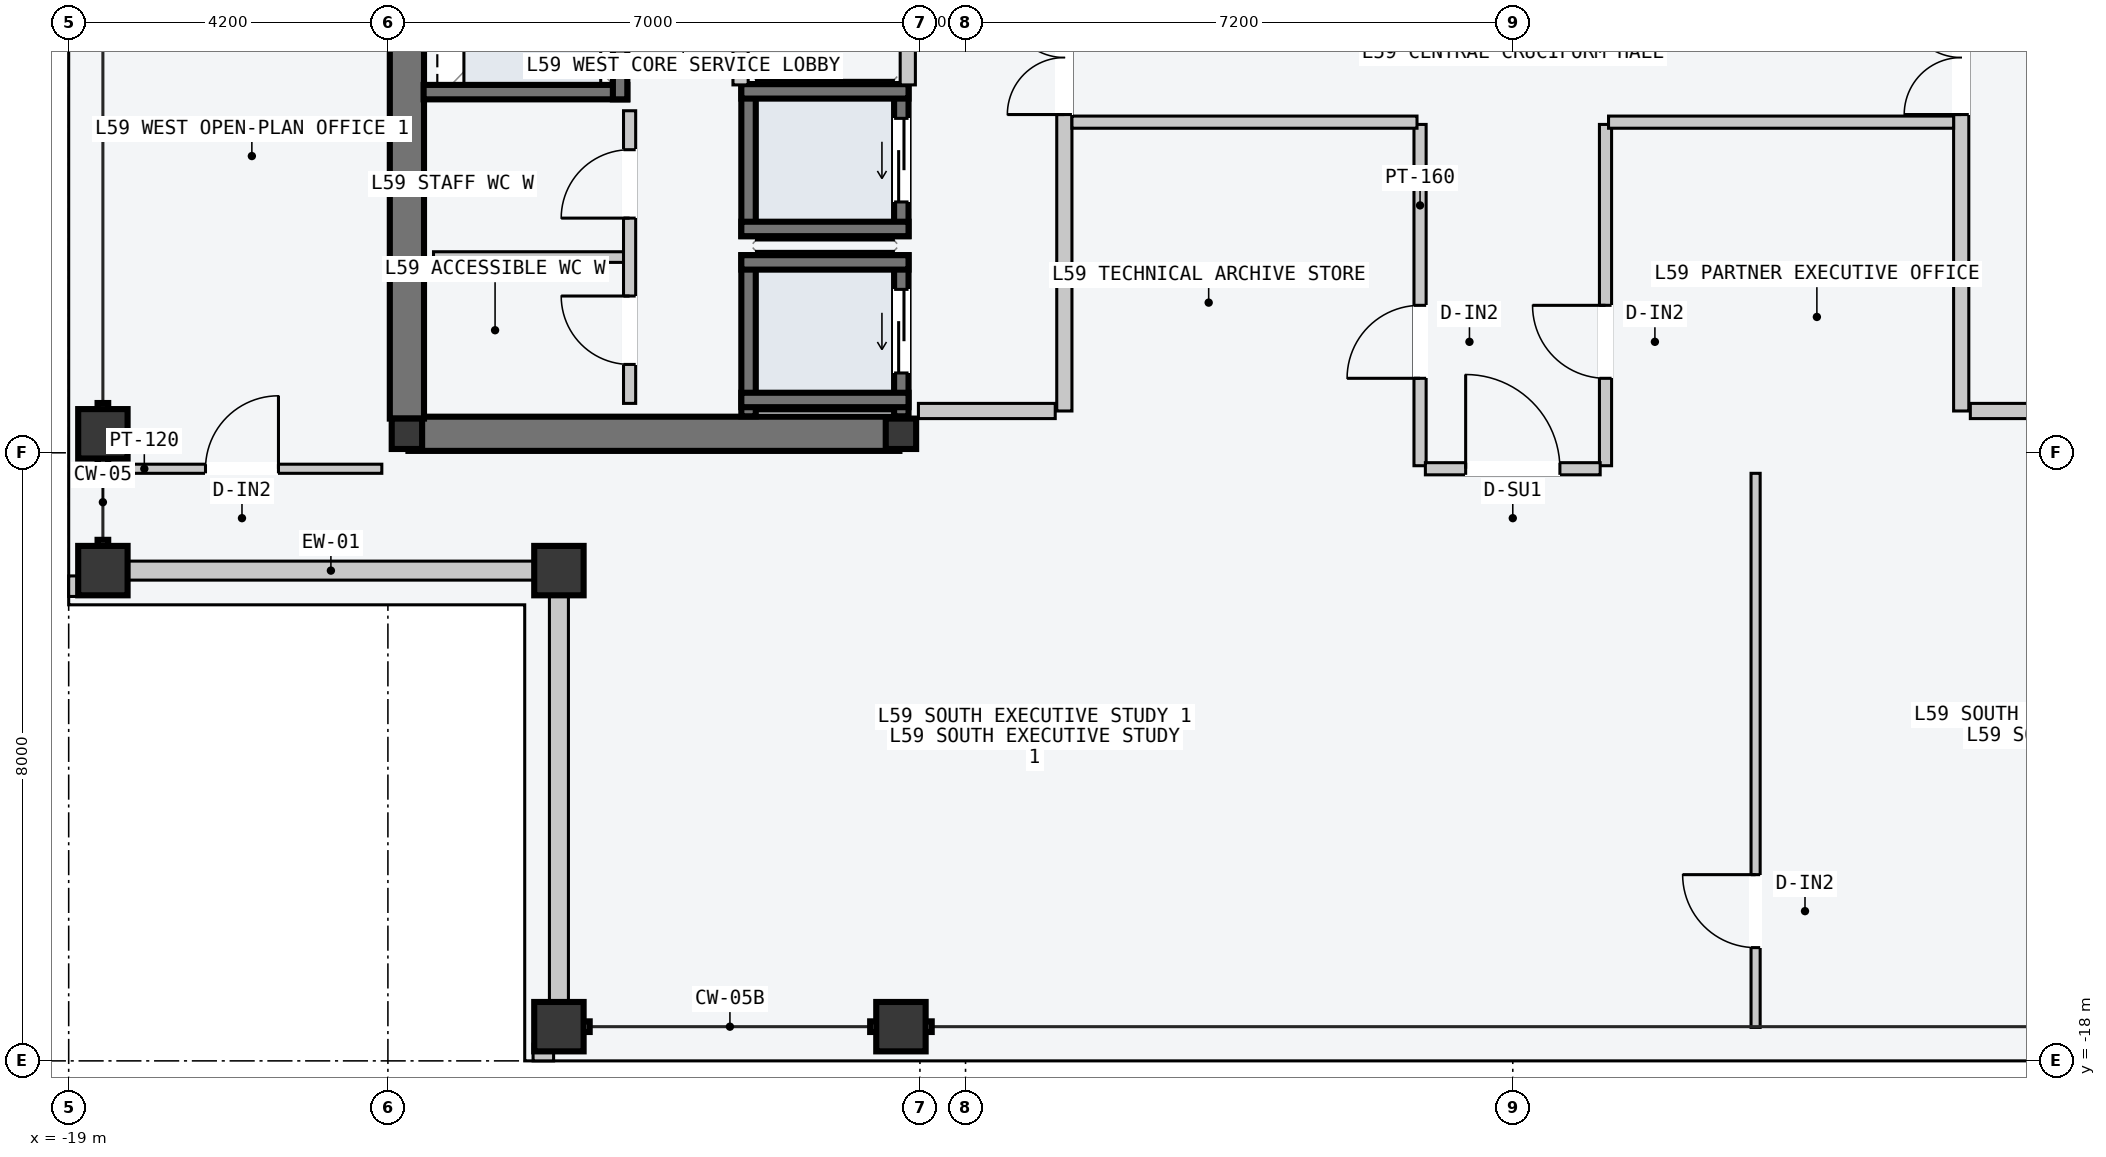
"""IFC4 building model, lengths in metres.
Left out: names, types, materials, properties, quantities, classifications, styles, units other than length and angle.
Written with IfcOpenShell. Run it as: python <this file> out.ifc"""

import sys

from ifc_helpers import new_model, si_unit, direction, frame, frame_2d, origin, origin_2d, place, context, subcontext, project, spatial, rectangle, hollow_rectangle, i_section, extrude, element, fill, save


model = new_model("IFC4")
c1 = context("Model", 3, precision=1e-05, world=origin(), true_north=direction((0.0, 1.0)))
c2 = subcontext(c1, "Body", "Model", "MODEL_VIEW")
j1 = project(units=[si_unit("LENGTHUNIT", "METRE"), si_unit("PLANEANGLEUNIT", "RADIAN")], contexts=[c1])
p1 = place(None, origin())
s1 = spatial("IfcSite", under=j1, at=p1, CompositionType="ELEMENT")
p2 = place(p1, origin())
s2 = spatial("IfcBuilding", under=s1, at=p2, CompositionType="ELEMENT")
p3 = place(p2, frame((0.0, 0.0, 225.6)))
s3 = spatial("IfcBuildingStorey", under=s2, at=p3, CompositionType="ELEMENT", Elevation=225.6)
p4 = place(p3, frame((-14.53, -9.75, -0.2), z_axis=(0.0, 0.0, 1.0), x_axis=(1.0, 0.0, 0.0)))
e1 = element("IfcWall", 1, at=p4, inside=s3, PredefinedType="SHEAR", context=c2, shape_type="SweptSolid", body=[
    extrude(rectangle(XDim=6.46, YDim=0.45, at=frame_2d((3.23, 0.0))), origin(), (0.0, 0.0, 1.0), 3.6),
])
p5 = place(p3, frame((-14.55, -9.55, -0.2), z_axis=(0.0, 0.0, 1.0), x_axis=(0.0, 1.0, 0.0)))
e2 = element("IfcWall", 2, at=p5, inside=s3, PredefinedType="SHEAR", context=c2, shape_type="SweptSolid", body=[
    extrude(rectangle(XDim=9.35, YDim=0.45, at=frame_2d((4.675, 0.0))), origin(), (0.0, 0.0, 1.0), 3.6),
])
for number, where, z_axis, x_axis in (
    (3, (-14.55, -9.75, 0.0), (0.0, 0.0, 1.0), (1.0, 0.0, 0.0)),
    (4, (-8.05, -9.75, 0.0), (0.0, 0.0, 1.0), (1.0, 0.0, 0.0)),
):
    element("IfcColumn", number, at=place(p3, frame(where, z_axis=z_axis, x_axis=x_axis)), inside=s3, PredefinedType="COLUMN", context=c2, shape_type="SweptSolid", body=[
        extrude(i_section(OverallWidth=0.4, OverallDepth=0.4, WebThickness=0.013, FlangeThickness=0.021, at=origin_2d()), origin(), (0.0, 0.0, 1.0), 3.6),
    ])
for number, where, z_axis, x_axis in (
    (5, (-12.55, -17.55, 0.0), (0.0, 0.0, 1.0), (1.0, 0.0, 0.0)),
    (6, (-8.05, -17.55, 0.0), (0.0, 0.0, 1.0), (1.0, 0.0, 0.0)),
    (7, (-18.55, -11.55, 0.0), (0.0, 0.0, 1.0), (0.0, 1.0, 0.0)),
    (8, (-18.55, -9.75, 0.0), (0.0, 0.0, 1.0), (0.0, 1.0, 0.0)),
    (9, (-12.55, -11.55, 0.0), (0.0, 0.0, 1.0), (1.0, 0.0, 0.0)),
):
    element("IfcColumn", number, at=place(p3, frame(where, z_axis=z_axis, x_axis=x_axis)), inside=s3, PredefinedType="COLUMN", context=c2, shape_type="SweptSolid", body=[
        extrude(hollow_rectangle(XDim=0.65, YDim=0.65, WallThickness=0.028, at=origin_2d()), origin(), (0.0, 0.0, 1.0), 3.6),
    ])
for number, where, z_axis, x_axis in (
    (10, (-18.215, -11.55, 0.0), (0.0, 0.0, 1.0), (1.0, 0.0, 0.0)),
    (11, (-12.55, -17.215, 0.0), (0.0, 0.0, 1.0), (0.0, 1.0, 0.0)),
):
    element("IfcWall", number, at=place(p3, frame(where, z_axis=z_axis, x_axis=x_axis)), inside=s3, PredefinedType="STANDARD", context=c2, shape_type="SweptSolid", body=[
        extrude(rectangle(XDim=5.33, YDim=0.25, at=frame_2d((2.665, 0.0))), origin(), (0.0, 0.0, 1.0), 2.85),
    ])
for number, where, z_axis, x_axis in (
    (12, (-12.89, -17.89, 0.0), (0.0, 0.0, 1.0), (1.0, 0.0, 0.0)),
    (13, (-18.89, -11.89, 0.0), (0.0, 0.0, 1.0), (0.0, 1.0, 0.0)),
):
    element("IfcWall", number, at=place(p3, frame(where, z_axis=z_axis, x_axis=x_axis)), inside=s3, PredefinedType="PARAPET", context=c2, shape_type="SweptSolid", body=[
        extrude(rectangle(XDim=0.27, YDim=0.22, at=frame_2d((0.135, 0.0))), origin(), (0.0, 0.0, 1.0), 1.2),
    ])
p6 = place(p3, frame((-8.045, -9.52, -0.2), z_axis=(0.0, 0.0, 1.0), x_axis=(0.0, 1.0, 0.0)))
e14 = element("IfcWall", 14, at=p6, inside=s3, PredefinedType="SOLIDWALL", context=c2, shape_type="SweptSolid", body=[
    extrude(rectangle(XDim=2.12, YDim=0.19, at=frame_2d((1.06, 0.0))), origin(), (0.0, 0.0, 1.0), 3.6),
])
p7 = place(p6, frame((0.57, 0.0, 0.2)))
e15 = element("IfcOpeningElement", 15, at=p7, cuts=e14, PredefinedType="OPENING", context=c2, shape_type="SweptSolid", body=[
    extrude(rectangle(XDim=1.1, YDim=2.2, at=frame_2d((0.55, 1.1))), frame((0.0, 0.105, 0.0), z_axis=(0.0, -1.0, 0.0), x_axis=(1.0, 0.0, 0.0)), (0.0, 0.0, 1.0), 0.21),
])
p8 = place(p3, frame((-10.055, -9.52, -0.2), z_axis=(0.0, 0.0, 1.0), x_axis=(0.0, 1.0, 0.0)))
e16 = element("IfcWall", 16, at=p8, inside=s3, PredefinedType="SOLIDWALL", context=c2, shape_type="SweptSolid", body=[
    extrude(rectangle(XDim=2.12, YDim=0.19, at=frame_2d((1.06, 0.0))), origin(), (0.0, 0.0, 1.0), 3.6),
])
for number, where, z_axis, x_axis in (
    (17, (-10.15, -7.495, -0.2), (0.0, 0.0, 1.0), (1.0, 0.0, 0.0)),
    (18, (-10.15, -9.305, -0.2), (0.0, 0.0, 1.0), (1.0, 0.0, 0.0)),
):
    element("IfcWall", number, at=place(p3, frame(where, z_axis=z_axis, x_axis=x_axis)), inside=s3, PredefinedType="SOLIDWALL", context=c2, shape_type="SweptSolid", body=[
        extrude(rectangle(XDim=2.2, YDim=0.19, at=frame_2d((1.1, 0.0))), origin(), (0.0, 0.0, 1.0), 3.6),
    ])
p9 = place(p3, frame((-8.045, -7.15, -0.2), z_axis=(0.0, 0.0, 1.0), x_axis=(0.0, 1.0, 0.0)))
e19 = element("IfcWall", 19, at=p9, inside=s3, PredefinedType="SOLIDWALL", context=c2, shape_type="SweptSolid", body=[
    extrude(rectangle(XDim=2.0, YDim=0.19, at=frame_2d((1.0, 0.0))), origin(), (0.0, 0.0, 1.0), 3.6),
])
p10 = place(p9, frame((0.45, 0.0, 0.2)))
e20 = element("IfcOpeningElement", 20, at=p10, cuts=e19, PredefinedType="OPENING", context=c2, shape_type="SweptSolid", body=[
    extrude(rectangle(XDim=1.1, YDim=2.2, at=frame_2d((0.55, 1.1))), frame((0.0, 0.105, 0.0), z_axis=(0.0, -1.0, 0.0), x_axis=(1.0, 0.0, 0.0)), (0.0, 0.0, 1.0), 0.21),
])
p11 = place(p3, frame((-10.055, -7.15, -0.2), z_axis=(0.0, 0.0, 1.0), x_axis=(0.0, 1.0, 0.0)))
e21 = element("IfcWall", 21, at=p11, inside=s3, PredefinedType="SOLIDWALL", context=c2, shape_type="SweptSolid", body=[
    extrude(rectangle(XDim=2.0, YDim=0.19, at=frame_2d((1.0, 0.0))), origin(), (0.0, 0.0, 1.0), 3.6),
])
for number, where, z_axis, x_axis in (
    (22, (-10.15, -5.245, -0.2), (0.0, 0.0, 1.0), (1.0, 0.0, 0.0)),
    (23, (-10.15, -7.055, -0.2), (0.0, 0.0, 1.0), (1.0, 0.0, 0.0)),
):
    element("IfcWall", number, at=place(p3, frame(where, z_axis=z_axis, x_axis=x_axis)), inside=s3, PredefinedType="SOLIDWALL", context=c2, shape_type="SweptSolid", body=[
        extrude(rectangle(XDim=2.2, YDim=0.19, at=frame_2d((1.1, 0.0))), origin(), (0.0, 0.0, 1.0), 3.6),
    ])
p12 = place(p3, frame((-14.33, -5.255, -0.2), z_axis=(0.0, 0.0, 1.0), x_axis=(1.0, 0.0, 0.0)))
e24 = element("IfcWall", 24, at=p12, inside=s3, PredefinedType="SOLIDWALL", context=c2, shape_type="SweptSolid", body=[
    extrude(rectangle(XDim=2.68, YDim=0.19, at=frame_2d((1.34, 0.0))), origin(), (0.0, 0.0, 1.0), 3.6),
])
p13 = place(p3, frame((-11.745, -5.35, -0.2), z_axis=(0.0, 0.0, 1.0), x_axis=(0.0, 1.0, 0.0)))
e25 = element("IfcWall", 25, at=p13, inside=s3, PredefinedType="SOLIDWALL", context=c2, shape_type="SweptSolid", body=[
    extrude(rectangle(XDim=2.6, YDim=0.19, at=frame_2d((1.3, 0.0))), origin(), (0.0, 0.0, 1.0), 3.6),
])
p14 = place(p3, frame((-5.9, -9.45, 0.0), z_axis=(0.0, 0.0, 1.0), x_axis=(0.0, 1.0, 0.0)))
e26 = element("IfcWall", 26, at=p14, inside=s3, PredefinedType="PARTITIONING", context=c2, shape_type="SweptSolid", body=[
    extrude(rectangle(XDim=10.5, YDim=0.2, at=frame_2d((5.25, 0.0))), origin(), (0.0, 0.0, 1.0), 3.4),
])
p15 = place(p14, frame((3.9, 0.0, 0.0)))
e27 = element("IfcOpeningElement", 27, at=p15, cuts=e26, PredefinedType="OPENING", context=c2, shape_type="SweptSolid", body=[
    extrude(rectangle(XDim=1.5, YDim=2.2, at=frame_2d((0.75, 1.1))), frame((0.0, 0.11, 0.0), z_axis=(0.0, -1.0, 0.0), x_axis=(1.0, 0.0, 0.0)), (0.0, 0.0, 1.0), 0.22),
])
p16 = place(p3, frame((-6.02, -9.45, 0.0), z_axis=(0.0, 0.0, 1.0), x_axis=(-1.0, 0.0, 0.0)))
e28 = element("IfcWall", 28, at=p16, inside=s3, PredefinedType="PARTITIONING", context=c2, shape_type="SweptSolid", body=[
    extrude(rectangle(XDim=1.8, YDim=0.2, at=frame_2d((0.9, 0.0))), origin(), (0.0, 0.0, 1.0), 3.4),
])
for number, where, z_axis, x_axis in (
    (29, (-7.96, -5.16, 0.0), (0.0, 0.0, 1.0), (0.0, 1.0, 0.0)),
    (30, (-10.16, -5.16, 0.0), (0.0, 0.0, 1.0), (0.0, 1.0, 0.0)),
):
    element("IfcWall", number, at=place(p3, frame(where, z_axis=z_axis, x_axis=x_axis)), inside=s3, PredefinedType="PARTITIONING", context=c2, shape_type="SweptSolid", body=[
        extrude(rectangle(XDim=2.44, YDim=0.2, at=frame_2d((1.22, 0.0))), origin(), (0.0, 0.0, 1.0), 3.4),
    ])
p17 = place(p3, frame((-11.7, -7.425, 0.0), z_axis=(0.0, 0.0, 1.0), x_axis=(-1.0, 0.0, 0.0)))
e31 = element("IfcWall", 31, at=p17, inside=s3, PredefinedType="PARTITIONING", context=c2, shape_type="SweptSolid", body=[
    extrude(rectangle(XDim=2.5, YDim=0.14, at=frame_2d((1.25, 0.0))), origin(), (0.0, 0.0, 1.0), 3.4),
])
p18 = place(p3, frame((-11.62, -9.35, 0.0), z_axis=(0.0, 0.0, 1.0), x_axis=(0.0, 1.0, 0.0)))
e32 = element("IfcWall", 32, at=p18, inside=s3, PredefinedType="PARTITIONING", context=c2, shape_type="SweptSolid", body=[
    extrude(rectangle(XDim=3.85, YDim=0.16, at=frame_2d((1.925, 0.0))), origin(), (0.0, 0.0, 1.0), 3.4),
])
p19 = place(p18, frame((0.512, 0.0, 0.0)))
e33 = element("IfcOpeningElement", 33, at=p19, cuts=e32, PredefinedType="OPENING", context=c2, shape_type="SweptSolid", body=[
    extrude(rectangle(XDim=0.9, YDim=2.15, at=frame_2d((0.45, 1.075))), frame((0.0, 0.09, 0.0), z_axis=(0.0, -1.0, 0.0), x_axis=(1.0, 0.0, 0.0)), (0.0, 0.0, 1.0), 0.18),
])
p20 = place(p18, frame((2.438, 0.0, 0.0)))
e34 = element("IfcOpeningElement", 34, at=p20, cuts=e32, PredefinedType="OPENING", context=c2, shape_type="SweptSolid", body=[
    extrude(rectangle(XDim=0.9, YDim=2.15, at=frame_2d((0.45, 1.075))), frame((0.0, 0.09, 0.0), z_axis=(0.0, -1.0, 0.0), x_axis=(1.0, 0.0, 0.0)), (0.0, 0.0, 1.0), 0.18),
])
p21 = place(p3, frame((5.9, -9.45, 0.0), z_axis=(0.0, 0.0, 1.0), x_axis=(0.0, 1.0, 0.0)))
e35 = element("IfcWall", 35, at=p21, inside=s3, PredefinedType="PARTITIONING", context=c2, shape_type="SweptSolid", body=[
    extrude(rectangle(XDim=10.5, YDim=0.2, at=frame_2d((5.25, 0.0))), origin(), (0.0, 0.0, 1.0), 3.4),
])
p22 = place(p21, frame((3.9, 0.0, 0.0)))
e36 = element("IfcOpeningElement", 36, at=p22, cuts=e35, PredefinedType="OPENING", context=c2, shape_type="SweptSolid", body=[
    extrude(rectangle(XDim=1.5, YDim=2.2, at=frame_2d((0.75, 1.1))), frame((0.0, 0.11, 0.0), z_axis=(0.0, -1.0, 0.0), x_axis=(1.0, 0.0, 0.0)), (0.0, 0.0, 1.0), 0.22),
])
p23 = place(p3, frame((6.02, -9.45, 0.0), z_axis=(0.0, 0.0, 1.0), x_axis=(1.0, 0.0, 0.0)))
e37 = element("IfcWall", 37, at=p23, inside=s3, PredefinedType="PARTITIONING", context=c2, shape_type="SweptSolid", body=[
    extrude(rectangle(XDim=1.8, YDim=0.2, at=frame_2d((0.9, 0.0))), origin(), (0.0, 0.0, 1.0), 3.4),
])
p24 = place(p3, frame((-1.22, -10.17, 0.0), z_axis=(0.0, 0.0, 1.0), x_axis=(0.0, 1.0, 0.0)))
e38 = element("IfcWall", 38, at=p24, inside=s3, PredefinedType="PARTITIONING", context=c2, shape_type="SweptSolid", body=[
    extrude(rectangle(XDim=4.49, YDim=0.16, at=frame_2d((2.245, 0.0))), origin(), (0.0, 0.0, 1.0), 3.4),
])
p25 = place(p24, frame((1.15, 0.0, 0.0)))
e39 = element("IfcOpeningElement", 39, at=p25, cuts=e38, PredefinedType="OPENING", context=c2, shape_type="SweptSolid", body=[
    extrude(rectangle(XDim=0.96, YDim=2.18, at=frame_2d((0.48, 1.09))), frame((0.0, 0.09, 0.0), z_axis=(0.0, -1.0, 0.0), x_axis=(1.0, 0.0, 0.0)), (0.0, 0.0, 1.0), 0.18),
])
p26 = place(p3, frame((1.22, -10.17, 0.0), z_axis=(0.0, 0.0, 1.0), x_axis=(0.0, 1.0, 0.0)))
e40 = element("IfcWall", 40, at=p26, inside=s3, PredefinedType="PARTITIONING", context=c2, shape_type="SweptSolid", body=[
    extrude(rectangle(XDim=4.49, YDim=0.16, at=frame_2d((2.245, 0.0))), origin(), (0.0, 0.0, 1.0), 3.4),
])
p27 = place(p26, frame((1.15, 0.0, 0.0)))
e41 = element("IfcOpeningElement", 41, at=p27, cuts=e40, PredefinedType="OPENING", context=c2, shape_type="SweptSolid", body=[
    extrude(rectangle(XDim=0.96, YDim=2.18, at=frame_2d((0.48, 1.09))), frame((0.0, 0.09, 0.0), z_axis=(0.0, -1.0, 0.0), x_axis=(1.0, 0.0, 0.0)), (0.0, 0.0, 1.0), 0.18),
])
for number, where, z_axis, x_axis in (
    (42, (-5.8, -5.65, 0.0), (0.0, 0.0, 1.0), (1.0, 0.0, 0.0)),
    (43, (1.26, -5.65, 0.0), (0.0, 0.0, 1.0), (1.0, 0.0, 0.0)),
):
    element("IfcWall", number, at=place(p3, frame(where, z_axis=z_axis, x_axis=x_axis)), inside=s3, PredefinedType="PARTITIONING", context=c2, shape_type="SweptSolid", body=[
        extrude(rectangle(XDim=4.54, YDim=0.16, at=frame_2d((2.27, 0.0))), origin(), (0.0, 0.0, 1.0), 3.4),
    ])
p28 = place(p3, frame((3.195, -17.56, 0.0), z_axis=(0.0, 0.0, 1.0), x_axis=(0.0, 1.0, 0.0)))
e44 = element("IfcWall", 44, at=p28, inside=s3, PredefinedType="PARTITIONING", context=c2, shape_type="SweptSolid", body=[
    extrude(rectangle(XDim=7.29, YDim=0.12, at=frame_2d((3.645, 0.0))), origin(), (0.0, 0.0, 1.0), 3.4),
])
p29 = place(p28, frame((1.05, 0.0, 0.0)))
e45 = element("IfcOpeningElement", 45, at=p29, cuts=e44, PredefinedType="OPENING", context=c2, shape_type="SweptSolid", body=[
    extrude(rectangle(XDim=0.96, YDim=2.18, at=frame_2d((0.48, 1.09))), frame((0.0, 0.07, 0.0), z_axis=(0.0, -1.0, 0.0), x_axis=(1.0, 0.0, 0.0)), (0.0, 0.0, 1.0), 0.14),
])
p30 = place(p3, frame((-1.15, -10.21, 0.0), z_axis=(0.0, 0.0, 1.0), x_axis=(1.0, 0.0, 0.0)))
e46 = element("IfcWall", 46, at=p30, inside=s3, PredefinedType="PARTITIONING", context=c2, shape_type="SweptSolid", body=[
    extrude(rectangle(XDim=2.3, YDim=0.16, at=frame_2d((1.15, 0.0))), origin(), (0.0, 0.0, 1.0), 3.4),
])
p31 = place(p30, frame((0.53, 0.0, 0.0)))
e47 = element("IfcOpeningElement", 47, at=p31, cuts=e46, PredefinedType="OPENING", context=c2, shape_type="SweptSolid", body=[
    extrude(rectangle(XDim=1.24, YDim=2.24, at=frame_2d((0.62, 1.12))), frame((0.0, 0.09, 0.0), z_axis=(0.0, -1.0, 0.0), x_axis=(1.0, 0.0, 0.0)), (0.0, 0.0, 1.0), 0.18),
])
p32 = place(p3, frame((-18.56, -10.21, 0.0), z_axis=(0.0, 0.0, 1.0), x_axis=(1.0, 0.0, 0.0)))
e48 = element("IfcWall", 48, at=p32, inside=s3, PredefinedType="PARTITIONING", context=c2, shape_type="SweptSolid", body=[
    extrude(rectangle(XDim=3.68, YDim=0.12, at=frame_2d((1.84, 0.0))), origin(), (0.0, 0.0, 1.0), 3.4),
])
p33 = place(p32, frame((1.36, 0.0, 0.0)))
e49 = element("IfcOpeningElement", 49, at=p33, cuts=e48, PredefinedType="OPENING", context=c2, shape_type="SweptSolid", body=[
    extrude(rectangle(XDim=0.96, YDim=2.18, at=frame_2d((0.48, 1.09))), frame((0.0, 0.07, 0.0), z_axis=(0.0, -1.0, 0.0), x_axis=(1.0, 0.0, 0.0)), (0.0, 0.0, 1.0), 0.14),
])
p34 = place(p7, origin())
e50 = element("IfcDoor", 50, at=p34, inside=s3, OperationType="SLIDING_TO_LEFT", PredefinedType="DOOR", context=c2, shape_type="SweptSolid", body=[
    extrude(rectangle(XDim=1.1, YDim=2.2, at=frame_2d((0.55, 1.1))), frame((0.0, 0.025, 0.0), z_axis=(0.0, -1.0, 0.0), x_axis=(1.0, 0.0, 0.0)), (0.0, 0.0, 1.0), 0.05),
])
fill(e15, e50)
p35 = place(p10, origin())
e51 = element("IfcDoor", 51, at=p35, inside=s3, OperationType="SLIDING_TO_LEFT", PredefinedType="DOOR", context=c2, shape_type="SweptSolid", body=[
    extrude(rectangle(XDim=1.1, YDim=2.2, at=frame_2d((0.55, 1.1))), frame((0.0, 0.025, 0.0), z_axis=(0.0, -1.0, 0.0), x_axis=(1.0, 0.0, 0.0)), (0.0, 0.0, 1.0), 0.05),
])
fill(e20, e51)
p36 = place(p15, origin())
e52 = element("IfcDoor", 52, at=p36, inside=s3, OperationType="DOUBLE_DOOR_SINGLE_SWING", PredefinedType="DOOR", context=c2, shape_type="SweptSolid", body=[
    extrude(rectangle(XDim=1.5, YDim=2.2, at=frame_2d((0.75, 1.1))), frame((0.0, 0.025, 0.0), z_axis=(0.0, -1.0, 0.0), x_axis=(1.0, 0.0, 0.0)), (0.0, 0.0, 1.0), 0.05),
])
fill(e27, e52)
p37 = place(p19, origin())
e53 = element("IfcDoor", 53, at=p37, inside=s3, OperationType="SINGLE_SWING_RIGHT", PredefinedType="DOOR", context=c2, shape_type="SweptSolid", body=[
    extrude(rectangle(XDim=0.9, YDim=2.15, at=frame_2d((0.45, 1.075))), frame((0.0, 0.025, 0.0), z_axis=(0.0, -1.0, 0.0), x_axis=(1.0, 0.0, 0.0)), (0.0, 0.0, 1.0), 0.05),
])
fill(e33, e53)
p38 = place(p20, origin())
e54 = element("IfcDoor", 54, at=p38, inside=s3, OperationType="SINGLE_SWING_LEFT", PredefinedType="DOOR", context=c2, shape_type="SweptSolid", body=[
    extrude(rectangle(XDim=0.9, YDim=2.15, at=frame_2d((0.45, 1.075))), frame((0.0, 0.025, 0.0), z_axis=(0.0, -1.0, 0.0), x_axis=(1.0, 0.0, 0.0)), (0.0, 0.0, 1.0), 0.05),
])
fill(e34, e54)
p39 = place(p22, origin())
e55 = element("IfcDoor", 55, at=p39, inside=s3, OperationType="DOUBLE_DOOR_SINGLE_SWING", PredefinedType="DOOR", context=c2, shape_type="SweptSolid", body=[
    extrude(rectangle(XDim=1.5, YDim=2.2, at=frame_2d((0.75, 1.1))), frame((0.0, 0.025, 0.0), z_axis=(0.0, -1.0, 0.0), x_axis=(1.0, 0.0, 0.0)), (0.0, 0.0, 1.0), 0.05),
])
fill(e36, e55)
p40 = place(p25, origin())
e56 = element("IfcDoor", 56, at=p40, inside=s3, OperationType="SINGLE_SWING_LEFT", PredefinedType="DOOR", context=c2, shape_type="SweptSolid", body=[
    extrude(rectangle(XDim=0.96, YDim=2.18, at=frame_2d((0.48, 1.09))), frame((0.0, 0.025, 0.0), z_axis=(0.0, -1.0, 0.0), x_axis=(1.0, 0.0, 0.0)), (0.0, 0.0, 1.0), 0.05),
])
fill(e39, e56)
p41 = place(p27, origin())
e57 = element("IfcDoor", 57, at=p41, inside=s3, OperationType="SINGLE_SWING_RIGHT", PredefinedType="DOOR", context=c2, shape_type="SweptSolid", body=[
    extrude(rectangle(XDim=0.96, YDim=2.18, at=frame_2d((0.48, 1.09))), frame((0.0, 0.025, 0.0), z_axis=(0.0, -1.0, 0.0), x_axis=(1.0, 0.0, 0.0)), (0.0, 0.0, 1.0), 0.05),
])
fill(e41, e57)
p42 = place(p29, origin())
e58 = element("IfcDoor", 58, at=p42, inside=s3, OperationType="SINGLE_SWING_RIGHT", PredefinedType="DOOR", context=c2, shape_type="SweptSolid", body=[
    extrude(rectangle(XDim=0.96, YDim=2.18, at=frame_2d((0.48, 1.09))), frame((0.0, 0.025, 0.0), z_axis=(0.0, -1.0, 0.0), x_axis=(1.0, 0.0, 0.0)), (0.0, 0.0, 1.0), 0.05),
])
fill(e45, e58)
p43 = place(p31, origin())
e59 = element("IfcDoor", 59, at=p43, inside=s3, OperationType="SINGLE_SWING_LEFT", PredefinedType="DOOR", context=c2, shape_type="SweptSolid", body=[
    extrude(rectangle(XDim=1.24, YDim=2.24, at=frame_2d((0.62, 1.12))), frame((0.0, 0.025, 0.0), z_axis=(0.0, -1.0, 0.0), x_axis=(1.0, 0.0, 0.0)), (0.0, 0.0, 1.0), 0.05),
])
fill(e47, e59)
p44 = place(p33, origin())
e60 = element("IfcDoor", 60, at=p44, inside=s3, OperationType="SINGLE_SWING_RIGHT", PredefinedType="DOOR", context=c2, shape_type="SweptSolid", body=[
    extrude(rectangle(XDim=0.96, YDim=2.18, at=frame_2d((0.48, 1.09))), frame((0.0, 0.025, 0.0), z_axis=(0.0, -1.0, 0.0), x_axis=(1.0, 0.0, 0.0)), (0.0, 0.0, 1.0), 0.05),
])
fill(e49, e60)
save(model, sys.argv[1])
